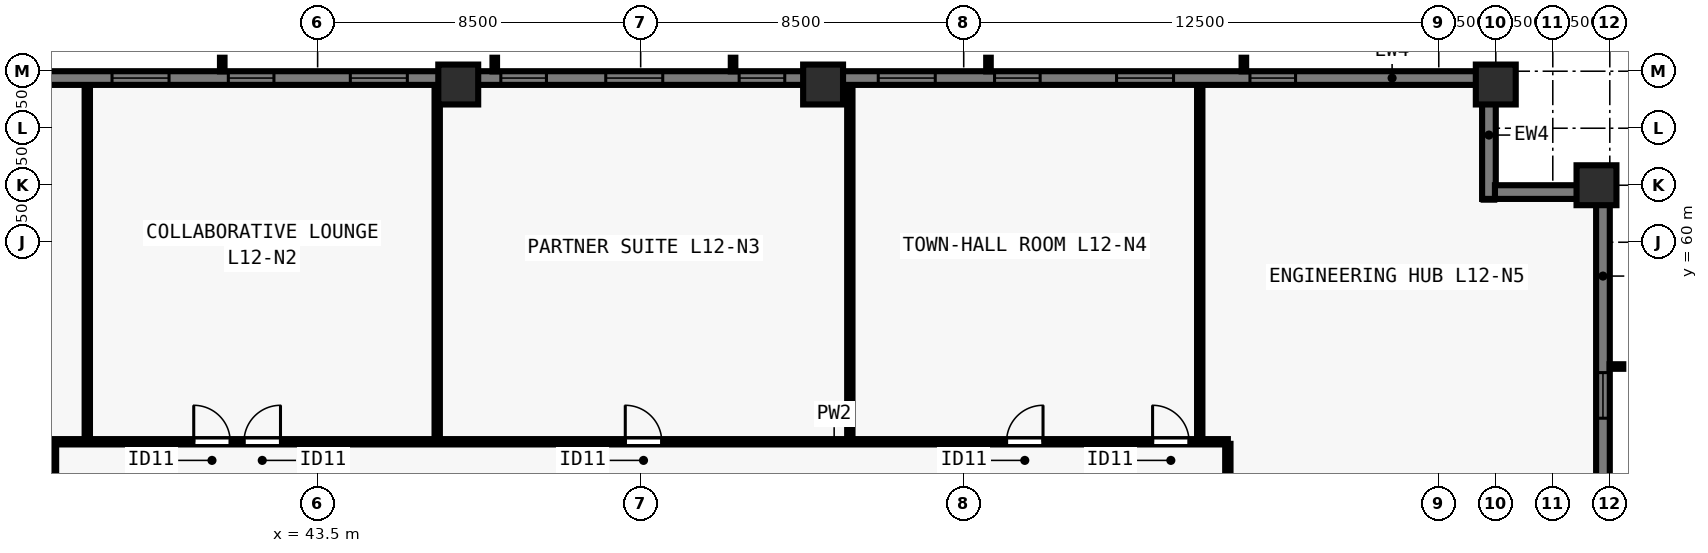
"""IFC4 building model, lengths in metres.
Left out: names, types, materials, properties, quantities, classifications, styles, units other than length and angle.
Written with IfcOpenShell. Run it as: python <this file> out.ifc"""

import sys

from ifc_helpers import new_model, si_unit, direction, frame, frame_2d, origin, origin_2d, place, context, subcontext, project, spatial, rectangle, extrude, element, fill, save


model = new_model("IFC4")
c1 = context("Model", 3, precision=1e-05, world=origin(), true_north=direction((0.0, 1.0)))
c2 = subcontext(c1, "Body", "Model", "MODEL_VIEW")
j1 = project(units=[si_unit("LENGTHUNIT", "METRE"), si_unit("PLANEANGLEUNIT", "RADIAN")], contexts=[c1])
p1 = place(None, origin())
s1 = spatial("IfcSite", under=j1, at=p1, CompositionType="ELEMENT")
p2 = place(p1, origin())
s2 = spatial("IfcBuilding", under=s1, at=p2, CompositionType="ELEMENT")
p3 = place(p2, frame((0.0, 0.0, 48.0)))
s3 = spatial("IfcBuildingStorey", under=s2, at=p3, CompositionType="ELEMENT", Elevation=48.0)
for number, where, z_axis, x_axis in (
    (1, (77.15, 61.5, 0.0), (0.0, 0.0, 1.0), (0.0, 1.0, 0.0)),
    (2, (74.5, 64.15, 0.0), (0.0, 0.0, 1.0), (1.0, 0.0, 0.0)),
    (3, (56.8, 64.15, 0.0), (0.0, 0.0, 1.0), (1.0, 0.0, 0.0)),
    (4, (47.2, 64.15, 0.0), (0.0, 0.0, 1.0), (1.0, 0.0, 0.0)),
):
    element("IfcColumn", number, at=place(p3, frame(where, z_axis=z_axis, x_axis=x_axis)), inside=s3, PredefinedType="COLUMN", context=c2, shape_type="SweptSolid", body=[
        extrude(rectangle(XDim=1.05, YDim=1.05, at=origin_2d()), origin(), (0.0, 0.0, 1.0), 3.5),
    ])
p4 = place(p3, frame((29.5, 64.32, 0.0), z_axis=(0.0, 0.0, 1.0), x_axis=(1.0, 0.0, 0.0)))
e5 = element("IfcWall", 5, at=p4, inside=s3, PredefinedType="SOLIDWALL", context=c2, shape_type="SweptSolid", body=[
    extrude(rectangle(XDim=44.662, YDim=0.36, at=frame_2d((22.331, 0.0))), origin(), (0.0, 0.0, 1.0), 3.28),
])
p5 = place(p4, frame((4.93, 0.0, 0.8)))
e6 = element("IfcOpeningElement", 6, at=p5, cuts=e5, PredefinedType="OPENING", context=c2, shape_type="SweptSolid", body=[
    extrude(rectangle(XDim=1.2, YDim=1.544, at=frame_2d((0.6, 0.772))), frame((0.0, 0.19, 0.0), z_axis=(0.0, -1.0, 0.0), x_axis=(1.0, 0.0, 0.0)), (0.0, 0.0, 1.0), 0.38),
])
p6 = place(p4, frame((8.59, 0.0, 0.8)))
e7 = element("IfcOpeningElement", 7, at=p6, cuts=e5, PredefinedType="OPENING", context=c2, shape_type="SweptSolid", body=[
    extrude(rectangle(XDim=1.5, YDim=1.544, at=frame_2d((0.75, 0.772))), frame((0.0, 0.19, 0.0), z_axis=(0.0, -1.0, 0.0), x_axis=(1.0, 0.0, 0.0)), (0.0, 0.0, 1.0), 0.38),
])
p7 = place(p4, frame((11.65, 0.0, 0.8)))
e8 = element("IfcOpeningElement", 8, at=p7, cuts=e5, PredefinedType="OPENING", context=c2, shape_type="SweptSolid", body=[
    extrude(rectangle(XDim=1.2, YDim=1.544, at=frame_2d((0.6, 0.772))), frame((0.0, 0.19, 0.0), z_axis=(0.0, -1.0, 0.0), x_axis=(1.0, 0.0, 0.0)), (0.0, 0.0, 1.0), 0.38),
])
p8 = place(p4, frame((14.861, 0.0, 0.8)))
e9 = element("IfcOpeningElement", 9, at=p8, cuts=e5, PredefinedType="OPENING", context=c2, shape_type="SweptSolid", body=[
    extrude(rectangle(XDim=1.5, YDim=1.544, at=frame_2d((0.75, 0.772))), frame((0.0, 0.19, 0.0), z_axis=(0.0, -1.0, 0.0), x_axis=(1.0, 0.0, 0.0)), (0.0, 0.0, 1.0), 0.38),
])
p9 = place(p4, frame((18.821, 0.0, 0.8)))
e10 = element("IfcOpeningElement", 10, at=p9, cuts=e5, PredefinedType="OPENING", context=c2, shape_type="SweptSolid", body=[
    extrude(rectangle(XDim=1.2, YDim=1.544, at=frame_2d((0.6, 0.772))), frame((0.0, 0.19, 0.0), z_axis=(0.0, -1.0, 0.0), x_axis=(1.0, 0.0, 0.0)), (0.0, 0.0, 1.0), 0.38),
])
p10 = place(p4, frame((21.581, 0.0, 0.8)))
e11 = element("IfcOpeningElement", 11, at=p10, cuts=e5, PredefinedType="OPENING", context=c2, shape_type="SweptSolid", body=[
    extrude(rectangle(XDim=1.5, YDim=1.544, at=frame_2d((0.75, 0.772))), frame((0.0, 0.19, 0.0), z_axis=(0.0, -1.0, 0.0), x_axis=(1.0, 0.0, 0.0)), (0.0, 0.0, 1.0), 0.38),
])
p11 = place(p4, frame((25.091, 0.0, 0.8)))
e12 = element("IfcOpeningElement", 12, at=p11, cuts=e5, PredefinedType="OPENING", context=c2, shape_type="SweptSolid", body=[
    extrude(rectangle(XDim=1.2, YDim=1.544, at=frame_2d((0.6, 0.772))), frame((0.0, 0.19, 0.0), z_axis=(0.0, -1.0, 0.0), x_axis=(1.0, 0.0, 0.0)), (0.0, 0.0, 1.0), 0.38),
])
p12 = place(p4, frame((28.751, 0.0, 0.8)))
e13 = element("IfcOpeningElement", 13, at=p12, cuts=e5, PredefinedType="OPENING", context=c2, shape_type="SweptSolid", body=[
    extrude(rectangle(XDim=1.5, YDim=1.544, at=frame_2d((0.75, 0.772))), frame((0.0, 0.19, 0.0), z_axis=(0.0, -1.0, 0.0), x_axis=(1.0, 0.0, 0.0)), (0.0, 0.0, 1.0), 0.38),
])
p13 = place(p4, frame((31.812, 0.0, 0.8)))
e14 = element("IfcOpeningElement", 14, at=p13, cuts=e5, PredefinedType="OPENING", context=c2, shape_type="SweptSolid", body=[
    extrude(rectangle(XDim=1.2, YDim=1.544, at=frame_2d((0.6, 0.772))), frame((0.0, 0.19, 0.0), z_axis=(0.0, -1.0, 0.0), x_axis=(1.0, 0.0, 0.0)), (0.0, 0.0, 1.0), 0.38),
])
p14 = place(p4, frame((35.022, 0.0, 0.8)))
e15 = element("IfcOpeningElement", 15, at=p14, cuts=e5, PredefinedType="OPENING", context=c2, shape_type="SweptSolid", body=[
    extrude(rectangle(XDim=1.5, YDim=1.544, at=frame_2d((0.75, 0.772))), frame((0.0, 0.19, 0.0), z_axis=(0.0, -1.0, 0.0), x_axis=(1.0, 0.0, 0.0)), (0.0, 0.0, 1.0), 0.38),
])
p15 = place(p4, frame((38.532, 0.0, 0.8)))
e16 = element("IfcOpeningElement", 16, at=p15, cuts=e5, PredefinedType="OPENING", context=c2, shape_type="SweptSolid", body=[
    extrude(rectangle(XDim=1.2, YDim=1.544, at=frame_2d((0.6, 0.772))), frame((0.0, 0.19, 0.0), z_axis=(0.0, -1.0, 0.0), x_axis=(1.0, 0.0, 0.0)), (0.0, 0.0, 1.0), 0.38),
])
p16 = place(p3, frame((74.32, 64.5, 0.0), z_axis=(0.0, 0.0, 1.0), x_axis=(0.0, -1.0, 0.0)))
e17 = element("IfcWall", 17, at=p16, inside=s3, PredefinedType="SOLIDWALL", context=c2, shape_type="SweptSolid", body=[
    extrude(rectangle(XDim=3.36, YDim=0.36, at=frame_2d((1.68, 0.0))), origin(), (0.0, 0.0, 1.0), 3.28),
])
p17 = place(p3, frame((74.478, 61.32, 0.0), z_axis=(0.0, 0.0, 1.0), x_axis=(1.0, 0.0, 0.0)))
e18 = element("IfcWall", 18, at=p17, inside=s3, PredefinedType="SOLIDWALL", context=c2, shape_type="SweptSolid", body=[
    extrude(rectangle(XDim=2.684, YDim=0.36, at=frame_2d((1.342, 0.0))), origin(), (0.0, 0.0, 1.0), 3.28),
])
p18 = place(p3, frame((77.32, 61.5, 0.0), z_axis=(0.0, 0.0, 1.0), x_axis=(0.0, -1.0, 0.0)))
e19 = element("IfcWall", 19, at=p18, inside=s3, PredefinedType="SOLIDWALL", context=c2, shape_type="SweptSolid", body=[
    extrude(rectangle(XDim=44.662, YDim=0.36, at=frame_2d((22.331, 0.0))), origin(), (0.0, 0.0, 1.0), 3.28),
])
p19 = place(p18, frame((4.93, 0.0, 0.8)))
e20 = element("IfcOpeningElement", 20, at=p19, cuts=e19, PredefinedType="OPENING", context=c2, shape_type="SweptSolid", body=[
    extrude(rectangle(XDim=1.2, YDim=1.544, at=frame_2d((0.6, 0.772))), frame((0.0, 0.19, 0.0), z_axis=(0.0, -1.0, 0.0), x_axis=(1.0, 0.0, 0.0)), (0.0, 0.0, 1.0), 0.38),
])
p20 = place(p18, frame((8.14, 0.0, 0.8)))
e21 = element("IfcOpeningElement", 21, at=p20, cuts=e19, PredefinedType="OPENING", context=c2, shape_type="SweptSolid", body=[
    extrude(rectangle(XDim=1.5, YDim=1.544, at=frame_2d((0.75, 0.772))), frame((0.0, 0.19, 0.0), z_axis=(0.0, -1.0, 0.0), x_axis=(1.0, 0.0, 0.0)), (0.0, 0.0, 1.0), 0.38),
])
p21 = place(p18, frame((11.65, 0.0, 0.8)))
e22 = element("IfcOpeningElement", 22, at=p21, cuts=e19, PredefinedType="OPENING", context=c2, shape_type="SweptSolid", body=[
    extrude(rectangle(XDim=1.2, YDim=1.544, at=frame_2d((0.6, 0.772))), frame((0.0, 0.19, 0.0), z_axis=(0.0, -1.0, 0.0), x_axis=(1.0, 0.0, 0.0)), (0.0, 0.0, 1.0), 0.38),
])
p22 = place(p18, frame((14.861, 0.0, 0.8)))
e23 = element("IfcOpeningElement", 23, at=p22, cuts=e19, PredefinedType="OPENING", context=c2, shape_type="SweptSolid", body=[
    extrude(rectangle(XDim=1.5, YDim=1.544, at=frame_2d((0.75, 0.772))), frame((0.0, 0.19, 0.0), z_axis=(0.0, -1.0, 0.0), x_axis=(1.0, 0.0, 0.0)), (0.0, 0.0, 1.0), 0.38),
])
p23 = place(p18, frame((18.821, 0.0, 0.8)))
e24 = element("IfcOpeningElement", 24, at=p23, cuts=e19, PredefinedType="OPENING", context=c2, shape_type="SweptSolid", body=[
    extrude(rectangle(XDim=1.2, YDim=1.544, at=frame_2d((0.6, 0.772))), frame((0.0, 0.19, 0.0), z_axis=(0.0, -1.0, 0.0), x_axis=(1.0, 0.0, 0.0)), (0.0, 0.0, 1.0), 0.38),
])
p24 = place(p18, frame((20.331, 0.0, 0.8)))
e25 = element("IfcOpeningElement", 25, at=p24, cuts=e19, PredefinedType="OPENING", context=c2, shape_type="SweptSolid", body=[
    extrude(rectangle(XDim=1.5, YDim=1.544, at=frame_2d((0.75, 0.772))), frame((0.0, 0.19, 0.0), z_axis=(0.0, -1.0, 0.0), x_axis=(1.0, 0.0, 0.0)), (0.0, 0.0, 1.0), 0.38),
])
p25 = place(p18, frame((25.091, 0.0, 0.8)))
e26 = element("IfcOpeningElement", 26, at=p25, cuts=e19, PredefinedType="OPENING", context=c2, shape_type="SweptSolid", body=[
    extrude(rectangle(XDim=1.2, YDim=1.544, at=frame_2d((0.6, 0.772))), frame((0.0, 0.19, 0.0), z_axis=(0.0, -1.0, 0.0), x_axis=(1.0, 0.0, 0.0)), (0.0, 0.0, 1.0), 0.38),
])
p26 = place(p18, frame((28.302, 0.0, 0.8)))
e27 = element("IfcOpeningElement", 27, at=p26, cuts=e19, PredefinedType="OPENING", context=c2, shape_type="SweptSolid", body=[
    extrude(rectangle(XDim=1.5, YDim=1.544, at=frame_2d((0.75, 0.772))), frame((0.0, 0.19, 0.0), z_axis=(0.0, -1.0, 0.0), x_axis=(1.0, 0.0, 0.0)), (0.0, 0.0, 1.0), 0.38),
])
p27 = place(p18, frame((31.812, 0.0, 0.8)))
e28 = element("IfcOpeningElement", 28, at=p27, cuts=e19, PredefinedType="OPENING", context=c2, shape_type="SweptSolid", body=[
    extrude(rectangle(XDim=1.2, YDim=1.544, at=frame_2d((0.6, 0.772))), frame((0.0, 0.19, 0.0), z_axis=(0.0, -1.0, 0.0), x_axis=(1.0, 0.0, 0.0)), (0.0, 0.0, 1.0), 0.38),
])
p28 = place(p18, frame((35.022, 0.0, 0.8)))
e29 = element("IfcOpeningElement", 29, at=p28, cuts=e19, PredefinedType="OPENING", context=c2, shape_type="SweptSolid", body=[
    extrude(rectangle(XDim=1.5, YDim=1.544, at=frame_2d((0.75, 0.772))), frame((0.0, 0.19, 0.0), z_axis=(0.0, -1.0, 0.0), x_axis=(1.0, 0.0, 0.0)), (0.0, 0.0, 1.0), 0.38),
])
p29 = place(p18, frame((38.532, 0.0, 0.8)))
e30 = element("IfcOpeningElement", 30, at=p29, cuts=e19, PredefinedType="OPENING", context=c2, shape_type="SweptSolid", body=[
    extrude(rectangle(XDim=1.2, YDim=1.544, at=frame_2d((0.6, 0.772))), frame((0.0, 0.19, 0.0), z_axis=(0.0, -1.0, 0.0), x_axis=(1.0, 0.0, 0.0)), (0.0, 0.0, 1.0), 0.38),
])
p30 = place(p3, frame((36.55, 54.75, 0.0), z_axis=(0.0, 0.0, 1.0), x_axis=(1.0, 0.0, 0.0)))
e31 = element("IfcWall", 31, at=p30, inside=s3, PredefinedType="PARTITIONING", context=c2, shape_type="SweptSolid", body=[
    extrude(rectangle(XDim=30.9, YDim=0.14, at=frame_2d((15.45, 0.0))), origin(), (0.0, 0.0, 1.0), 3.28),
])
p31 = place(p30, frame((3.69, 0.0, 0.0)))
e32 = element("IfcOpeningElement", 32, at=p31, cuts=e31, PredefinedType="OPENING", context=c2, shape_type="SweptSolid", body=[
    extrude(rectangle(XDim=0.96, YDim=2.12, at=frame_2d((0.48, 1.06))), frame((0.0, 0.08, 0.0), z_axis=(0.0, -1.0, 0.0), x_axis=(1.0, 0.0, 0.0)), (0.0, 0.0, 1.0), 0.16),
])
p32 = place(p30, frame((5.013, 0.0, 0.0)))
e33 = element("IfcOpeningElement", 33, at=p32, cuts=e31, PredefinedType="OPENING", context=c2, shape_type="SweptSolid", body=[
    extrude(rectangle(XDim=0.96, YDim=2.12, at=frame_2d((0.48, 1.06))), frame((0.0, 0.08, 0.0), z_axis=(0.0, -1.0, 0.0), x_axis=(1.0, 0.0, 0.0)), (0.0, 0.0, 1.0), 0.16),
])
p33 = place(p30, frame((15.045, 0.0, 0.0)))
e34 = element("IfcOpeningElement", 34, at=p33, cuts=e31, PredefinedType="OPENING", context=c2, shape_type="SweptSolid", body=[
    extrude(rectangle(XDim=0.96, YDim=2.12, at=frame_2d((0.48, 1.06))), frame((0.0, 0.08, 0.0), z_axis=(0.0, -1.0, 0.0), x_axis=(1.0, 0.0, 0.0)), (0.0, 0.0, 1.0), 0.16),
])
p34 = place(p30, frame((25.077, 0.0, 0.0)))
e35 = element("IfcOpeningElement", 35, at=p34, cuts=e31, PredefinedType="OPENING", context=c2, shape_type="SweptSolid", body=[
    extrude(rectangle(XDim=0.96, YDim=2.12, at=frame_2d((0.48, 1.06))), frame((0.0, 0.08, 0.0), z_axis=(0.0, -1.0, 0.0), x_axis=(1.0, 0.0, 0.0)), (0.0, 0.0, 1.0), 0.16),
])
p35 = place(p30, frame((28.92, 0.0, 0.0)))
e36 = element("IfcOpeningElement", 36, at=p35, cuts=e31, PredefinedType="OPENING", context=c2, shape_type="SweptSolid", body=[
    extrude(rectangle(XDim=0.96, YDim=2.12, at=frame_2d((0.48, 1.06))), frame((0.0, 0.08, 0.0), z_axis=(0.0, -1.0, 0.0), x_axis=(1.0, 0.0, 0.0)), (0.0, 0.0, 1.0), 0.16),
])
p36 = place(p3, frame((36.55, 23.305, 0.0), z_axis=(0.0, 0.0, 1.0), x_axis=(0.0, 1.0, 0.0)))
e37 = element("IfcWall", 37, at=p36, inside=s3, PredefinedType="PARTITIONING", context=c2, shape_type="SweptSolid", body=[
    extrude(rectangle(XDim=31.39, YDim=0.14, at=frame_2d((15.695, 0.0))), origin(), (0.0, 0.0, 1.0), 3.28),
])
p37 = place(p36, frame((3.307, 0.0, 0.0)))
e38 = element("IfcOpeningElement", 38, at=p37, cuts=e37, PredefinedType="OPENING", context=c2, shape_type="SweptSolid", body=[
    extrude(rectangle(XDim=0.96, YDim=2.12, at=frame_2d((0.48, 1.06))), frame((0.0, 0.08, 0.0), z_axis=(0.0, -1.0, 0.0), x_axis=(1.0, 0.0, 0.0)), (0.0, 0.0, 1.0), 0.16),
])
p38 = place(p36, frame((11.25, 0.0, 0.0)))
e39 = element("IfcOpeningElement", 39, at=p38, cuts=e37, PredefinedType="OPENING", context=c2, shape_type="SweptSolid", body=[
    extrude(rectangle(XDim=0.96, YDim=2.12, at=frame_2d((0.48, 1.06))), frame((0.0, 0.08, 0.0), z_axis=(0.0, -1.0, 0.0), x_axis=(1.0, 0.0, 0.0)), (0.0, 0.0, 1.0), 0.16),
])
p39 = place(p36, frame((19.075, 0.0, 0.0)))
e40 = element("IfcOpeningElement", 40, at=p39, cuts=e37, PredefinedType="OPENING", context=c2, shape_type="SweptSolid", body=[
    extrude(rectangle(XDim=0.96, YDim=2.12, at=frame_2d((0.48, 1.06))), frame((0.0, 0.08, 0.0), z_axis=(0.0, -1.0, 0.0), x_axis=(1.0, 0.0, 0.0)), (0.0, 0.0, 1.0), 0.16),
])
p40 = place(p36, frame((26.782, 0.0, 0.0)))
e41 = element("IfcOpeningElement", 41, at=p40, cuts=e37, PredefinedType="OPENING", context=c2, shape_type="SweptSolid", body=[
    extrude(rectangle(XDim=0.96, YDim=2.12, at=frame_2d((0.48, 1.06))), frame((0.0, 0.08, 0.0), z_axis=(0.0, -1.0, 0.0), x_axis=(1.0, 0.0, 0.0)), (0.0, 0.0, 1.0), 0.16),
])
p41 = place(p3, frame((67.45, 23.305, 0.0), z_axis=(0.0, 0.0, 1.0), x_axis=(0.0, 1.0, 0.0)))
e42 = element("IfcWall", 42, at=p41, inside=s3, PredefinedType="PARTITIONING", context=c2, shape_type="SweptSolid", body=[
    extrude(rectangle(XDim=31.39, YDim=0.14, at=frame_2d((15.695, 0.0))), origin(), (0.0, 0.0, 1.0), 3.28),
])
p42 = place(p41, frame((7.561, 0.0, 0.0)))
e43 = element("IfcOpeningElement", 43, at=p42, cuts=e42, PredefinedType="OPENING", context=c2, shape_type="SweptSolid", body=[
    extrude(rectangle(XDim=0.96, YDim=2.12, at=frame_2d((0.48, 1.06))), frame((0.0, 0.08, 0.0), z_axis=(0.0, -1.0, 0.0), x_axis=(1.0, 0.0, 0.0)), (0.0, 0.0, 1.0), 0.16),
])
p43 = place(p41, frame((23.211, 0.0, 0.0)))
e44 = element("IfcOpeningElement", 44, at=p43, cuts=e42, PredefinedType="OPENING", context=c2, shape_type="SweptSolid", body=[
    extrude(rectangle(XDim=0.96, YDim=2.12, at=frame_2d((0.48, 1.06))), frame((0.0, 0.08, 0.0), z_axis=(0.0, -1.0, 0.0), x_axis=(1.0, 0.0, 0.0)), (0.0, 0.0, 1.0), 0.16),
])
for number, where, z_axis, x_axis in (
    (45, (37.439, 54.85, 0.0), (0.0, 0.0, 1.0), (0.0, 1.0, 0.0)),
    (46, (46.646, 54.85, 0.0), (0.0, 0.0, 1.0), (0.0, 1.0, 0.0)),
    (47, (57.503, 54.85, 0.0), (0.0, 0.0, 1.0), (0.0, 1.0, 0.0)),
):
    element("IfcWall", number, at=place(p3, frame(where, z_axis=z_axis, x_axis=x_axis)), inside=s3, PredefinedType="PARTITIONING", context=c2, shape_type="SweptSolid", body=[
        extrude(rectangle(XDim=9.23, YDim=0.14, at=frame_2d((4.615, 0.0))), origin(), (0.0, 0.0, 1.0), 3.28),
    ])
p44 = place(p3, frame((66.71, 54.85, 0.0), z_axis=(0.0, 0.0, 1.0), x_axis=(0.0, 1.0, 0.0)))
e48 = element("IfcWall", 48, at=p44, inside=s3, PredefinedType="PARTITIONING", context=c2, shape_type="SweptSolid", body=[
    extrude(rectangle(XDim=9.23, YDim=0.14, at=frame_2d((4.615, 0.0))), origin(), (0.0, 0.0, 1.0), 2.439),
])
p45 = place(p6, origin())
e49 = element("IfcWindow", 49, at=p45, inside=s3, PartitioningType="SINGLE_PANEL", PredefinedType="WINDOW", context=c2, shape_type="SweptSolid", body=[
    extrude(rectangle(XDim=1.5, YDim=1.544, at=frame_2d((0.75, 0.772))), frame((0.0, -0.05, 0.0), z_axis=(0.0, -1.0, 0.0), x_axis=(1.0, 0.0, 0.0)), (0.0, 0.0, 1.0), 0.06),
])
fill(e7, e49)
p46 = place(p7, origin())
e50 = element("IfcWindow", 50, at=p46, inside=s3, PartitioningType="SINGLE_PANEL", PredefinedType="WINDOW", context=c2, shape_type="SweptSolid", body=[
    extrude(rectangle(XDim=1.2, YDim=1.544, at=frame_2d((0.6, 0.772))), frame((0.0, -0.05, 0.0), z_axis=(0.0, -1.0, 0.0), x_axis=(1.0, 0.0, 0.0)), (0.0, 0.0, 1.0), 0.06),
])
fill(e8, e50)
p47 = place(p8, origin())
e51 = element("IfcWindow", 51, at=p47, inside=s3, PartitioningType="SINGLE_PANEL", PredefinedType="WINDOW", context=c2, shape_type="SweptSolid", body=[
    extrude(rectangle(XDim=1.5, YDim=1.544, at=frame_2d((0.75, 0.772))), frame((0.0, -0.05, 0.0), z_axis=(0.0, -1.0, 0.0), x_axis=(1.0, 0.0, 0.0)), (0.0, 0.0, 1.0), 0.06),
])
fill(e9, e51)
p48 = place(p9, origin())
e52 = element("IfcWindow", 52, at=p48, inside=s3, PartitioningType="SINGLE_PANEL", PredefinedType="WINDOW", context=c2, shape_type="SweptSolid", body=[
    extrude(rectangle(XDim=1.2, YDim=1.544, at=frame_2d((0.6, 0.772))), frame((0.0, -0.05, 0.0), z_axis=(0.0, -1.0, 0.0), x_axis=(1.0, 0.0, 0.0)), (0.0, 0.0, 1.0), 0.06),
])
fill(e10, e52)
p49 = place(p10, origin())
e53 = element("IfcWindow", 53, at=p49, inside=s3, PartitioningType="SINGLE_PANEL", PredefinedType="WINDOW", context=c2, shape_type="SweptSolid", body=[
    extrude(rectangle(XDim=1.5, YDim=1.544, at=frame_2d((0.75, 0.772))), frame((0.0, -0.05, 0.0), z_axis=(0.0, -1.0, 0.0), x_axis=(1.0, 0.0, 0.0)), (0.0, 0.0, 1.0), 0.06),
])
fill(e11, e53)
p50 = place(p11, origin())
e54 = element("IfcWindow", 54, at=p50, inside=s3, PartitioningType="SINGLE_PANEL", PredefinedType="WINDOW", context=c2, shape_type="SweptSolid", body=[
    extrude(rectangle(XDim=1.2, YDim=1.544, at=frame_2d((0.6, 0.772))), frame((0.0, -0.05, 0.0), z_axis=(0.0, -1.0, 0.0), x_axis=(1.0, 0.0, 0.0)), (0.0, 0.0, 1.0), 0.06),
])
fill(e12, e54)
p51 = place(p12, origin())
e55 = element("IfcWindow", 55, at=p51, inside=s3, PartitioningType="SINGLE_PANEL", PredefinedType="WINDOW", context=c2, shape_type="SweptSolid", body=[
    extrude(rectangle(XDim=1.5, YDim=1.544, at=frame_2d((0.75, 0.772))), frame((0.0, -0.05, 0.0), z_axis=(0.0, -1.0, 0.0), x_axis=(1.0, 0.0, 0.0)), (0.0, 0.0, 1.0), 0.06),
])
fill(e13, e55)
p52 = place(p13, origin())
e56 = element("IfcWindow", 56, at=p52, inside=s3, PartitioningType="SINGLE_PANEL", PredefinedType="WINDOW", context=c2, shape_type="SweptSolid", body=[
    extrude(rectangle(XDim=1.2, YDim=1.544, at=frame_2d((0.6, 0.772))), frame((0.0, -0.05, 0.0), z_axis=(0.0, -1.0, 0.0), x_axis=(1.0, 0.0, 0.0)), (0.0, 0.0, 1.0), 0.06),
])
fill(e14, e56)
p53 = place(p14, origin())
e57 = element("IfcWindow", 57, at=p53, inside=s3, PartitioningType="SINGLE_PANEL", PredefinedType="WINDOW", context=c2, shape_type="SweptSolid", body=[
    extrude(rectangle(XDim=1.5, YDim=1.544, at=frame_2d((0.75, 0.772))), frame((0.0, -0.05, 0.0), z_axis=(0.0, -1.0, 0.0), x_axis=(1.0, 0.0, 0.0)), (0.0, 0.0, 1.0), 0.06),
])
fill(e15, e57)
p54 = place(p15, origin())
e58 = element("IfcWindow", 58, at=p54, inside=s3, PartitioningType="SINGLE_PANEL", PredefinedType="WINDOW", context=c2, shape_type="SweptSolid", body=[
    extrude(rectangle(XDim=1.2, YDim=1.544, at=frame_2d((0.6, 0.772))), frame((0.0, -0.05, 0.0), z_axis=(0.0, -1.0, 0.0), x_axis=(1.0, 0.0, 0.0)), (0.0, 0.0, 1.0), 0.06),
])
fill(e16, e58)
p55 = place(p19, origin())
e59 = element("IfcWindow", 59, at=p55, inside=s3, PartitioningType="SINGLE_PANEL", PredefinedType="WINDOW", context=c2, shape_type="SweptSolid", body=[
    extrude(rectangle(XDim=1.2, YDim=1.544, at=frame_2d((0.6, 0.772))), frame((0.0, -0.05, 0.0), z_axis=(0.0, -1.0, 0.0), x_axis=(1.0, 0.0, 0.0)), (0.0, 0.0, 1.0), 0.06),
])
fill(e20, e59)
p56 = place(p31, origin())
e60 = element("IfcDoor", 60, at=p56, inside=s3, OperationType="SINGLE_SWING_LEFT", PredefinedType="DOOR", context=c2, shape_type="SweptSolid", body=[
    extrude(rectangle(XDim=0.96, YDim=2.12, at=frame_2d((0.48, 1.06))), frame((0.0, 0.025, 0.0), z_axis=(0.0, -1.0, 0.0), x_axis=(1.0, 0.0, 0.0)), (0.0, 0.0, 1.0), 0.05),
])
fill(e32, e60)
p57 = place(p32, origin())
e61 = element("IfcDoor", 61, at=p57, inside=s3, OperationType="SINGLE_SWING_RIGHT", PredefinedType="DOOR", context=c2, shape_type="SweptSolid", body=[
    extrude(rectangle(XDim=0.96, YDim=2.12, at=frame_2d((0.48, 1.06))), frame((0.0, 0.025, 0.0), z_axis=(0.0, -1.0, 0.0), x_axis=(1.0, 0.0, 0.0)), (0.0, 0.0, 1.0), 0.05),
])
fill(e33, e61)
p58 = place(p33, origin())
e62 = element("IfcDoor", 62, at=p58, inside=s3, OperationType="SINGLE_SWING_LEFT", PredefinedType="DOOR", context=c2, shape_type="SweptSolid", body=[
    extrude(rectangle(XDim=0.96, YDim=2.12, at=frame_2d((0.48, 1.06))), frame((0.0, 0.025, 0.0), z_axis=(0.0, -1.0, 0.0), x_axis=(1.0, 0.0, 0.0)), (0.0, 0.0, 1.0), 0.05),
])
fill(e34, e62)
p59 = place(p34, origin())
e63 = element("IfcDoor", 63, at=p59, inside=s3, OperationType="SINGLE_SWING_RIGHT", PredefinedType="DOOR", context=c2, shape_type="SweptSolid", body=[
    extrude(rectangle(XDim=0.96, YDim=2.12, at=frame_2d((0.48, 1.06))), frame((0.0, 0.025, 0.0), z_axis=(0.0, -1.0, 0.0), x_axis=(1.0, 0.0, 0.0)), (0.0, 0.0, 1.0), 0.05),
])
fill(e35, e63)
p60 = place(p35, origin())
e64 = element("IfcDoor", 64, at=p60, inside=s3, OperationType="SINGLE_SWING_LEFT", PredefinedType="DOOR", context=c2, shape_type="SweptSolid", body=[
    extrude(rectangle(XDim=0.96, YDim=2.12, at=frame_2d((0.48, 1.06))), frame((0.0, 0.025, 0.0), z_axis=(0.0, -1.0, 0.0), x_axis=(1.0, 0.0, 0.0)), (0.0, 0.0, 1.0), 0.05),
])
fill(e36, e64)
save(model, sys.argv[1])
